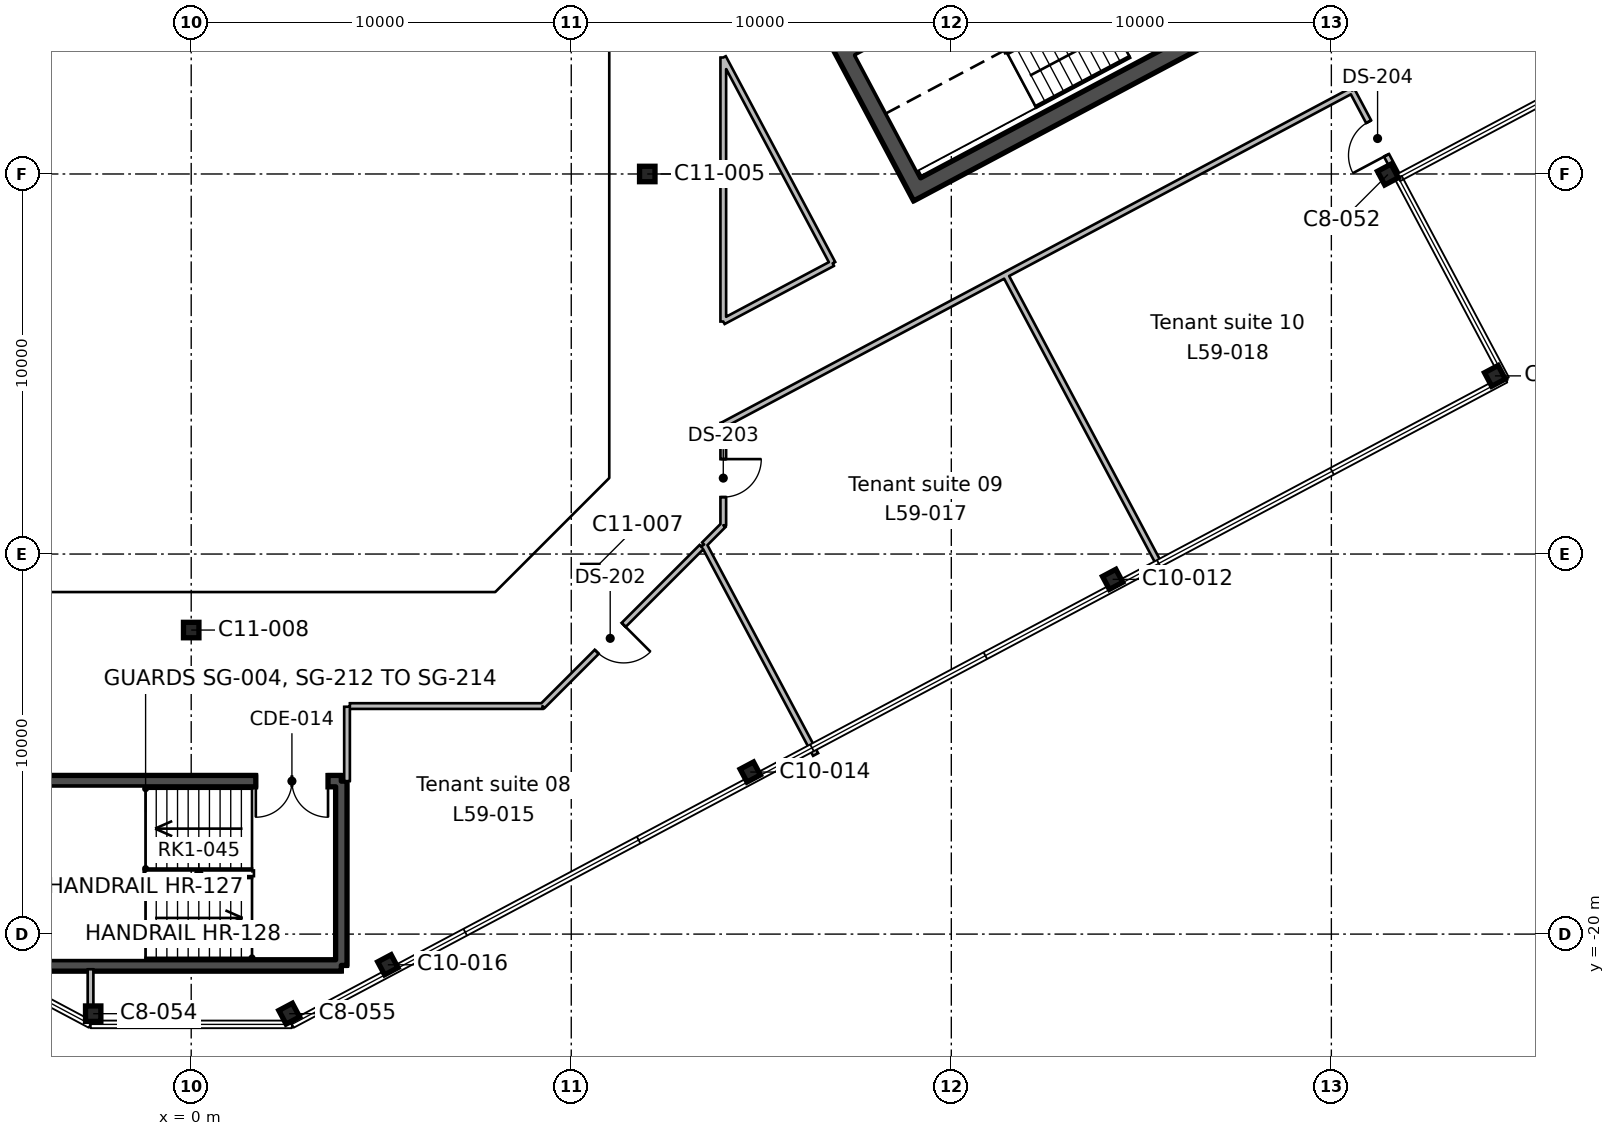
"""IFC4 building model, lengths in metres.
Left out: names, types, materials, properties, quantities, classifications, styles, units other than length and angle.
Written with IfcOpenShell. Run it as: python <this file> out.ifc"""

import sys

from ifc_helpers import new_model, si_unit, direction, frame, frame_2d, origin, origin_2d, place, context, subcontext, project, spatial, rectangle, hollow_rectangle, i_section, extrude, element, fill, save


model = new_model("IFC4")
c1 = context("Model", 3, precision=1e-05, world=origin(), true_north=direction((0.0, 1.0)))
c2 = subcontext(c1, "Body", "Model", "MODEL_VIEW")
j1 = project(units=[si_unit("LENGTHUNIT", "METRE"), si_unit("PLANEANGLEUNIT", "RADIAN")], contexts=[c1])
p1 = place(None, origin())
s1 = spatial("IfcSite", under=j1, at=p1, CompositionType="ELEMENT")
p2 = place(p1, origin())
s2 = spatial("IfcBuilding", under=s1, at=p2, CompositionType="ELEMENT")
p3 = place(p2, frame((0.0, 0.0, 265.8)))
s3 = spatial("IfcBuildingStorey", under=s2, at=p3, CompositionType="ELEMENT", Elevation=265.8)
for number, where, z_axis, x_axis in (
    (1, (-2.579, -22.094, 0.0), (0.0, 0.0, 1.0), (1.0, 0.0, 0.0)),
    (2, (2.579, -22.094, 0.0), (0.0, 0.0, 1.0), (0.883, 0.469, 0.0)),
):
    element("IfcColumn", number, at=place(p3, frame(where, z_axis=z_axis, x_axis=x_axis)), inside=s3, PredefinedType="COLUMN", context=c2, shape_type="SweptSolid", body=[
        extrude(i_section(OverallWidth=0.404, OverallDepth=0.406, WebThickness=0.027, FlangeThickness=0.044, FilletRadius=0.015, at=origin_2d()), origin(), (0.0, 0.0, 1.0), 3.9),
    ])
for number, where, z_axis, x_axis in (
    (3, (5.174, -20.807, 0.0), (0.0, 0.0, 1.0), (0.883, 0.469, 0.0)),
    (4, (14.71, -15.736, 0.0), (0.0, 0.0, 1.0), (0.883, 0.469, 0.0)),
):
    element("IfcColumn", number, at=place(p3, frame(where, z_axis=z_axis, x_axis=x_axis)), inside=s3, PredefinedType="COLUMN", context=c2, shape_type="SweptSolid", body=[
        extrude(i_section(OverallWidth=0.399, OverallDepth=0.386, WebThickness=0.021, FlangeThickness=0.033, FilletRadius=0.015, at=origin_2d()), origin(), (0.0, 0.0, 1.0), 3.9),
    ])
p4 = place(p3, frame((0.0, -12.0, 0.0), z_axis=(0.0, 0.0, 1.0), x_axis=(1.0, 0.0, 0.0)))
e5 = element("IfcColumn", 5, at=p4, inside=s3, PredefinedType="COLUMN", context=c2, shape_type="SweptSolid", body=[
    extrude(hollow_rectangle(XDim=0.406, YDim=0.406, WallThickness=0.009, InnerFilletRadius=0.004, OuterFilletRadius=0.013, at=origin_2d()), origin(), (0.0, 0.0, 1.0), 3.9),
])
p5 = place(p3, frame((24.245, -10.666, 0.0), z_axis=(0.0, 0.0, 1.0), x_axis=(0.882947592859, 0.469471562786, 0.0)))
e6 = element("IfcColumn", 6, at=p5, inside=s3, PredefinedType="COLUMN", context=c2, shape_type="SweptSolid", body=[
    extrude(i_section(OverallWidth=0.399, OverallDepth=0.386, WebThickness=0.021, FlangeThickness=0.033, FilletRadius=0.015, at=origin_2d()), origin(), (0.0, 0.0, 1.0), 3.9),
])
p6 = place(p3, frame((10.5, -10.5, 0.0), z_axis=(0.0, 0.0, 1.0), x_axis=(1.0, 0.0, 0.0)))
e7 = element("IfcColumn", 7, at=p6, inside=s3, PredefinedType="COLUMN", context=c2, shape_type="SweptSolid", body=[
    extrude(hollow_rectangle(XDim=0.406, YDim=0.406, WallThickness=0.009, InnerFilletRadius=0.004, OuterFilletRadius=0.013, at=origin_2d()), origin(), (0.0, 0.0, 1.0), 3.9),
])
for number, where, z_axis, x_axis in (
    (8, (34.304, -5.312, 0.0), (0.0, 0.0, 1.0), (-0.469, 0.883, 0.0)),
    (9, (31.487, -0.014, 0.0), (0.0, 0.0, 1.0), (0.883, 0.469, 0.0)),
):
    element("IfcColumn", number, at=place(p3, frame(where, z_axis=z_axis, x_axis=x_axis)), inside=s3, PredefinedType="COLUMN", context=c2, shape_type="SweptSolid", body=[
        extrude(i_section(OverallWidth=0.404, OverallDepth=0.406, WebThickness=0.027, FlangeThickness=0.044, FilletRadius=0.015, at=origin_2d()), origin(), (0.0, 0.0, 1.0), 3.9),
    ])
p7 = place(p3, frame((12.0, 0.0, 0.0), z_axis=(0.0, 0.0, 1.0), x_axis=(1.0, 0.0, 0.0)))
e10 = element("IfcColumn", 10, at=p7, inside=s3, PredefinedType="COLUMN", context=c2, shape_type="SweptSolid", body=[
    extrude(hollow_rectangle(XDim=0.406, YDim=0.406, WallThickness=0.009, InnerFilletRadius=0.004, OuterFilletRadius=0.013, at=origin_2d()), origin(), (0.0, 0.0, 1.0), 3.9),
])
p8 = place(p3, frame((19.207, -0.604, 0.0), z_axis=(0.0, 0.0, 1.0), x_axis=(-0.469467968382, 0.882949504028, 0.0)))
e11 = element("IfcWall", 11, at=p8, inside=s3, PredefinedType="SHEAR", context=c2, shape_type="SweptSolid", body=[
    extrude(rectangle(XDim=19.1, YDim=0.45, at=frame_2d((9.55, 0.0))), origin(), (0.0, 0.0, 1.0), 3.9),
])
p9 = place(p8, frame((6.55, 0.0, 0.0)))
e12 = element("IfcOpeningElement", 12, at=p9, cuts=e11, PredefinedType="OPENING", context=c2, shape_type="SweptSolid", body=[
    extrude(rectangle(XDim=2.4, YDim=2.4, at=frame_2d((1.2, 1.2))), frame((0.0, 0.235, 0.0), z_axis=(0.0, -1.0, 0.0), x_axis=(1.0, 0.0, 0.0)), (0.0, 0.0, 1.0), 0.47),
])
p10 = place(p3, frame((19.3, -0.299, 0.0), z_axis=(0.0, 0.0, 1.0), x_axis=(0.88295276571, 0.46946183394, 0.0)))
e13 = element("IfcWall", 13, at=p10, inside=s3, PredefinedType="SHEAR", context=c2, shape_type="SweptSolid", body=[
    extrude(rectangle(XDim=20.2, YDim=0.45, at=frame_2d((10.1, 0.0))), origin(), (0.0, 0.0, 1.0), 3.9),
])
p11 = place(p3, frame((17.434, 3.21, 0.0), z_axis=(0.0, 0.0, 1.0), x_axis=(0.882940221191, 0.469485426614, 0.0)))
e14 = element("IfcWall", 14, at=p11, inside=s3, PredefinedType="SHEAR", context=c2, shape_type="SweptSolid", body=[
    extrude(rectangle(XDim=8.0, YDim=0.2, at=frame_2d((4.0, 0.0))), origin(), (0.0, 0.0, 1.0), 3.9),
])
p12 = place(p3, frame((3.95, -15.975, 0.0), z_axis=(0.0, 0.0, 1.0), x_axis=(0.0, -1.0, 0.0)))
e15 = element("IfcWall", 15, at=p12, inside=s3, PredefinedType="SHEAR", context=c2, shape_type="SweptSolid", body=[
    extrude(rectangle(XDim=4.85, YDim=0.3, at=frame_2d((2.425, 0.0))), origin(), (0.0, 0.0, 1.0), 3.9),
])
p13 = place(p3, frame((3.95, -20.825, 0.0), z_axis=(0.0, 0.0, 1.0), x_axis=(-1.0, 0.0, 0.0)))
e16 = element("IfcWall", 16, at=p13, inside=s3, PredefinedType="SHEAR", context=c2, shape_type="SweptSolid", body=[
    extrude(rectangle(XDim=8.3, YDim=0.3, at=frame_2d((4.15, 0.0))), origin(), (0.0, 0.0, 1.0), 3.9),
])
p14 = place(p3, frame((-4.35, -15.975, 0.0), z_axis=(0.0, 0.0, 1.0), x_axis=(1.0, 0.0, 0.0)))
e17 = element("IfcWall", 17, at=p14, inside=s3, PredefinedType="SHEAR", context=c2, shape_type="SweptSolid", body=[
    extrude(rectangle(XDim=8.3, YDim=0.3, at=frame_2d((4.15, 0.0))), origin(), (0.0, 0.0, 1.0), 3.9),
])
p15 = place(p14, frame((6.05, 0.0, 0.0)))
e18 = element("IfcOpeningElement", 18, at=p15, cuts=e17, PredefinedType="OPENING", context=c2, shape_type="SweptSolid", body=[
    extrude(rectangle(XDim=1.9, YDim=2.1, at=frame_2d((0.95, 1.05))), frame((0.0, 0.16, 0.0), z_axis=(0.0, -1.0, 0.0), x_axis=(1.0, 0.0, 0.0)), (0.0, 0.0, 1.0), 0.32),
])
p16 = place(p3, frame((-2.649, -20.925, 0.0), z_axis=(0.0, 0.0, 1.0), x_axis=(0.0, -1.0, 0.0)))
e19 = element("IfcWall", 19, at=p16, inside=s3, PredefinedType="PARTITIONING", context=c2, shape_type="SweptSolid", body=[
    extrude(rectangle(XDim=0.966, YDim=0.15, at=frame_2d((0.483, 0.0))), origin(), (0.0, 0.0, 1.0), 3.54),
])
p17 = place(p3, frame((4.1, -15.975, 0.0), z_axis=(0.0, 0.0, 1.0), x_axis=(0.0, 1.0, 0.0)))
e20 = element("IfcWall", 20, at=p17, inside=s3, PredefinedType="PARTITIONING", context=c2, shape_type="SweptSolid", body=[
    extrude(rectangle(XDim=1.957, YDim=0.15, at=frame_2d((0.979, 0.0))), origin(), (0.0, 0.0, 1.0), 3.54),
])
p18 = place(p3, frame((13.429, -9.814, 0.0), z_axis=(0.0, 0.0, 1.0), x_axis=(-0.707106781187, -0.707106781187, 0.0)))
e21 = element("IfcWall", 21, at=p18, inside=s3, PredefinedType="PARTITIONING", context=c2, shape_type="SweptSolid", body=[
    extrude(rectangle(XDim=5.92, YDim=0.15, at=frame_2d((2.96, 0.0))), origin(), (0.0, 0.0, 1.0), 3.54),
])
p19 = place(p18, frame((2.9, 0.0, 0.0)))
e22 = element("IfcOpeningElement", 22, at=p19, cuts=e21, PredefinedType="OPENING", context=c2, shape_type="SweptSolid", body=[
    extrude(rectangle(XDim=1.0, YDim=2.1, at=frame_2d((0.5, 1.05))), frame((0.0, 0.085, 0.0), z_axis=(0.0, -1.0, 0.0), x_axis=(1.0, 0.0, 0.0)), (0.0, 0.0, 1.0), 0.17),
])
p20 = place(p3, frame((9.243, -14.0, 0.0), z_axis=(0.0, 0.0, 1.0), x_axis=(-1.0, 0.0, 0.0)))
e23 = element("IfcWall", 23, at=p20, inside=s3, PredefinedType="PARTITIONING", context=c2, shape_type="SweptSolid", body=[
    extrude(rectangle(XDim=5.068, YDim=0.15, at=frame_2d((2.534, 0.0))), origin(), (0.0, 0.0, 1.0), 3.54),
])
p21 = place(p3, frame((13.491, -9.752, 0.0), z_axis=(0.0, 0.0, 1.0), x_axis=(0.469644039597, -0.882855863701, 0.0)))
e24 = element("IfcWall", 24, at=p21, inside=s3, PredefinedType="PARTITIONING", context=c2, shape_type="SweptSolid", body=[
    extrude(rectangle(XDim=6.256, YDim=0.15, at=frame_2d((3.128, 0.0))), origin(), (0.0, 0.0, 1.0), 3.54),
])
p22 = place(p3, frame((14.0, -6.55, 0.0), z_axis=(0.0, 0.0, 1.0), x_axis=(0.0, -1.0, 0.0)))
e25 = element("IfcWall", 25, at=p22, inside=s3, PredefinedType="PARTITIONING", context=c2, shape_type="SweptSolid", body=[
    extrude(rectangle(XDim=2.693, YDim=0.15, at=frame_2d((1.346, 0.0))), origin(), (0.0, 0.0, 1.0), 3.54),
])
p23 = place(p22, frame((0.952, 0.0, 0.0)))
e26 = element("IfcOpeningElement", 26, at=p23, cuts=e25, PredefinedType="OPENING", context=c2, shape_type="SweptSolid", body=[
    extrude(rectangle(XDim=1.0, YDim=2.1, at=frame_2d((0.5, 1.05))), frame((0.0, 0.085, 0.0), z_axis=(0.0, -1.0, 0.0), x_axis=(1.0, 0.0, 0.0)), (0.0, 0.0, 1.0), 0.17),
])
p24 = place(p3, frame((13.495, -9.748, 0.0), z_axis=(0.0, 0.0, 1.0), x_axis=(0.706252478894, 0.707960052585, 0.0)))
e27 = element("IfcWall", 27, at=p24, inside=s3, PredefinedType="PARTITIONING", context=c2, shape_type="SweptSolid", body=[
    extrude(rectangle(XDim=0.715, YDim=0.15, at=frame_2d((0.357, 0.0))), origin(), (0.0, 0.0, 1.0), 3.54),
])
p25 = place(p3, frame((21.421, -2.654, 0.0), z_axis=(0.0, 0.0, 1.0), x_axis=(0.469445946219, -0.882961212952, 0.0)))
e28 = element("IfcWall", 28, at=p25, inside=s3, PredefinedType="PARTITIONING", context=c2, shape_type="SweptSolid", body=[
    extrude(rectangle(XDim=8.8, YDim=0.15, at=frame_2d((4.4, 0.0))), origin(), (0.0, 0.0, 1.0), 3.54),
])
p26 = place(p3, frame((31.897, -0.347, 0.0), z_axis=(0.0, 0.0, 1.0), x_axis=(-0.469576437406, 0.882891822045, 0.0)))
e29 = element("IfcWall", 29, at=p26, inside=s3, PredefinedType="PARTITIONING", context=c2, shape_type="SweptSolid", body=[
    extrude(rectangle(XDim=2.881, YDim=0.15, at=frame_2d((1.441, 0.0))), origin(), (0.0, 0.0, 1.0), 3.54),
])
p27 = place(p26, frame((0.95, 0.0, 0.0)))
e30 = element("IfcOpeningElement", 30, at=p27, cuts=e29, PredefinedType="OPENING", context=c2, shape_type="SweptSolid", body=[
    extrude(rectangle(XDim=1.0, YDim=2.1, at=frame_2d((0.5, 1.05))), frame((0.0, 0.085, 0.0), z_axis=(0.0, -1.0, 0.0), x_axis=(1.0, 0.0, 0.0)), (0.0, 0.0, 1.0), 0.17),
])
p28 = place(p3, frame((30.544, 2.197, 0.0), z_axis=(0.0, 0.0, 1.0), x_axis=(-0.88293548313, -0.469494337165, 0.0)))
e31 = element("IfcWall", 31, at=p28, inside=s3, PredefinedType="PARTITIONING", context=c2, shape_type="SweptSolid", body=[
    extrude(rectangle(XDim=18.738, YDim=0.15, at=frame_2d((9.369, 0.0))), origin(), (0.0, 0.0, 1.0), 3.54),
])
p29 = place(p3, frame((14.0, -3.882, 0.0), z_axis=(0.0, 0.0, 1.0), x_axis=(0.882913997068, 0.469534741826, 0.0)))
e32 = element("IfcWall", 32, at=p29, inside=s3, PredefinedType="PARTITIONING", context=c2, shape_type="SweptSolid", body=[
    extrude(rectangle(XDim=3.261, YDim=0.15, at=frame_2d((1.63, 0.0))), origin(), (0.0, 0.0, 1.0), 3.54),
])
p30 = place(p3, frame((16.879, -2.351, 0.0), z_axis=(0.0, 0.0, 1.0), x_axis=(-0.469364750374, 0.883004377739, 0.0)))
e33 = element("IfcWall", 33, at=p30, inside=s3, PredefinedType="PARTITIONING", context=c2, shape_type="SweptSolid", body=[
    extrude(rectangle(XDim=6.134, YDim=0.15, at=frame_2d((3.067, 0.0))), origin(), (0.0, 0.0, 1.0), 3.54),
])
p31 = place(p3, frame((14.0, 3.065, 0.0), z_axis=(0.0, 0.0, 1.0), x_axis=(0.0, -1.0, 0.0)))
e34 = element("IfcWall", 34, at=p31, inside=s3, PredefinedType="PARTITIONING", context=c2, shape_type="SweptSolid", body=[
    extrude(rectangle(XDim=6.947, YDim=0.15, at=frame_2d((3.474, 0.0))), origin(), (0.0, 0.0, 1.0), 3.54),
])
p32 = place(p15, frame((1.9, 0.0, 0.0), z_axis=(0.0, 0.0, 1.0), x_axis=(-1.0, 0.0, 0.0)))
e35 = element("IfcDoor", 35, at=p32, inside=s3, OperationType="DOUBLE_DOOR_SINGLE_SWING", PredefinedType="DOOR", context=c2, shape_type="SweptSolid", body=[
    extrude(rectangle(XDim=1.9, YDim=2.1, at=frame_2d((0.95, 1.05))), frame((0.0, 0.025, 0.0), z_axis=(0.0, -1.0, 0.0), x_axis=(1.0, 0.0, 0.0)), (0.0, 0.0, 1.0), 0.05),
])
fill(e18, e35)
p33 = place(p19, origin())
e36 = element("IfcDoor", 36, at=p33, inside=s3, OperationType="SINGLE_SWING_LEFT", PredefinedType="DOOR", context=c2, shape_type="SweptSolid", body=[
    extrude(rectangle(XDim=1.0, YDim=2.1, at=frame_2d((0.5, 1.05))), frame((0.0, 0.025, 0.0), z_axis=(0.0, -1.0, 0.0), x_axis=(1.0, 0.0, 0.0)), (0.0, 0.0, 1.0), 0.05),
])
fill(e22, e36)
p34 = place(p23, origin())
e37 = element("IfcDoor", 37, at=p34, inside=s3, OperationType="SINGLE_SWING_LEFT", PredefinedType="DOOR", context=c2, shape_type="SweptSolid", body=[
    extrude(rectangle(XDim=1.0, YDim=2.1, at=frame_2d((0.5, 1.05))), frame((0.0, 0.025, 0.0), z_axis=(0.0, -1.0, 0.0), x_axis=(1.0, 0.0, 0.0)), (0.0, 0.0, 1.0), 0.05),
])
fill(e26, e37)
p35 = place(p27, origin())
e38 = element("IfcDoor", 38, at=p35, inside=s3, OperationType="SINGLE_SWING_LEFT", PredefinedType="DOOR", context=c2, shape_type="SweptSolid", body=[
    extrude(rectangle(XDim=1.0, YDim=2.1, at=frame_2d((0.5, 1.05))), frame((0.0, 0.025, 0.0), z_axis=(0.0, -1.0, 0.0), x_axis=(1.0, 0.0, 0.0)), (0.0, 0.0, 1.0), 0.05),
])
fill(e30, e38)
save(model, sys.argv[1])
